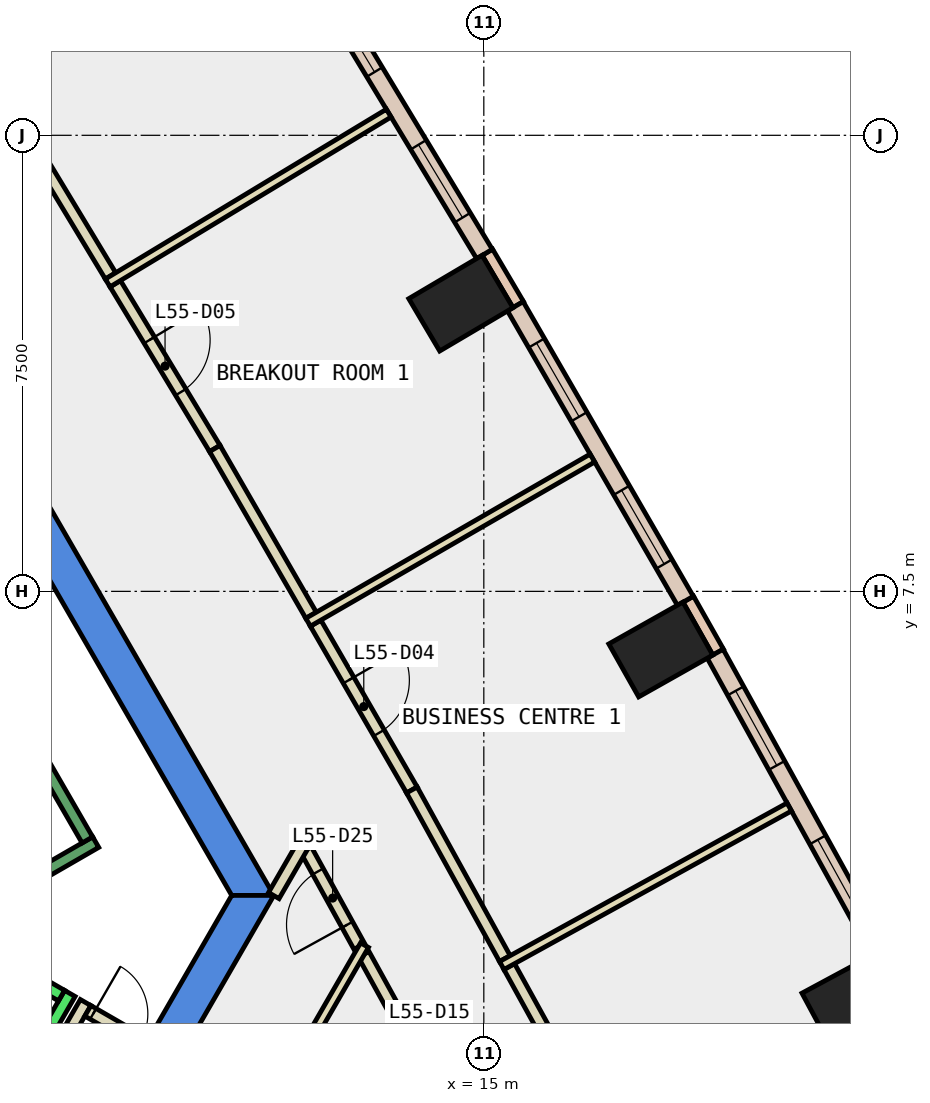
"""IFC4 building model, lengths in metres.
Left out: names, types, materials, properties, quantities, classifications, styles, units other than length and angle.
Written with IfcOpenShell. Run it as: python <this file> out.ifc"""

import sys

from ifc_helpers import new_model, si_unit, direction, frame, frame_2d, origin, origin_2d, place, context, subcontext, project, spatial, polyline, rectangle, outline, extrude, element, fill, save


model = new_model("IFC4")
c1 = context("Model", 3, precision=1e-05, world=origin(), true_north=direction((0.0, 1.0)))
c2 = subcontext(c1, "Body", "Model", "MODEL_VIEW")
j1 = project(units=[si_unit("LENGTHUNIT", "METRE"), si_unit("PLANEANGLEUNIT", "RADIAN")], contexts=[c1])
p1 = place(None, origin())
s1 = spatial("IfcSite", under=j1, at=p1, CompositionType="ELEMENT")
p2 = place(p1, origin())
s2 = spatial("IfcBuilding", under=s1, at=p2, CompositionType="ELEMENT")
p3 = place(p2, frame((0.0, 0.0, 245.0)))
s3 = spatial("IfcBuildingStorey", under=s2, at=p3, CompositionType="ELEMENT", Elevation=245.0)
for number, where, z_axis, x_axis in (
    (1, (21.086, 0.784, -0.34), (0.0, 0.0, 1.0), (-0.474, 0.881, 0.0)),
    (2, (17.911, 6.544, -0.34), (0.0, 0.0, 1.0), (-0.491, 0.871, 0.0)),
    (3, (14.623, 12.239, -0.34), (0.0, 0.0, 1.0), (-0.509, 0.861, 0.0)),
):
    element("IfcColumn", number, at=place(p3, frame(where, z_axis=z_axis, x_axis=x_axis)), inside=s3, PredefinedType="COLUMN", context=c2, shape_type="SweptSolid", body=[
        extrude(rectangle(XDim=1.0, YDim=1.4, at=origin_2d()), origin(), (0.0, 0.0, 1.0), 3.6),
    ])
p4 = place(p3, frame((0.0, 0.0, -0.34)))
e4 = element("IfcWall", 4, at=p4, inside=s3, PredefinedType="SHEAR", context=c2, shape_type="SweptSolid", body=[
    extrude(outline(polyline([(6.786, 10.747), (6.266, 10.447), (10.854, 2.5), (11.547, 2.5), (6.786, 10.747)])), origin(), (0.0, 0.0, 1.0), 3.6),
])
p5 = place(p3, frame((0.0, 0.0, -0.34)))
e5 = element("IfcWall", 5, at=p5, inside=s3, PredefinedType="SHEAR", context=c2, shape_type="SweptSolid", body=[
    extrude(outline(polyline([(5.774, -7.5), (11.547, 2.5), (10.854, 2.5), (5.427, -6.9), (5.774, -7.5)])), origin(), (0.0, 0.0, 1.0), 3.6),
])
p6 = place(p3, frame((18.854, 6.501, 0.0), z_axis=(0.0, 0.0, 1.0), x_axis=(-0.491743606947, 0.87074004446, 0.0)))
e6 = element("IfcWall", 6, at=p6, inside=s3, PredefinedType="STANDARD", context=c2, shape_type="SweptSolid", body=[
    extrude(rectangle(XDim=1.0, YDim=0.2, at=frame_2d((0.5, 0.0))), origin(), (0.0, 0.0, 1.0), 3.26),
])
p7 = place(p3, frame((15.566, 12.216, 0.0), z_axis=(0.0, 0.0, 1.0), x_axis=(-0.508087253435, 0.86130560366, 0.0)))
e7 = element("IfcWall", 7, at=p7, inside=s3, PredefinedType="STANDARD", context=c2, shape_type="SweptSolid", body=[
    extrude(rectangle(XDim=1.0, YDim=0.2, at=frame_2d((0.5, 0.0))), origin(), (0.0, 0.0, 1.0), 3.26),
])
p8 = place(p3, frame((21.505, 1.577, 0.0), z_axis=(0.0, 0.0, 1.0), x_axis=(-0.482734585173, 0.875766704253, 0.0)))
e8 = element("IfcWall", 8, at=p8, inside=s3, PredefinedType="STANDARD", context=c2, shape_type="SweptSolid", body=[
    extrude(rectangle(XDim=5.593, YDim=0.3, at=frame_2d((2.796, 0.0))), origin(), (0.0, 0.0, 1.0), 3.26),
])
p9 = place(p8, frame((0.698, 0.0, 0.9)))
e9 = element("IfcOpeningElement", 9, at=p9, cuts=e8, PredefinedType="OPENING", context=c2, shape_type="SweptSolid", body=[
    extrude(rectangle(XDim=1.4, YDim=2.0, at=frame_2d((0.7, 1.0))), frame((0.0, 0.16, 0.0), z_axis=(0.0, -1.0, 0.0), x_axis=(1.0, 0.0, 0.0)), (0.0, 0.0, 1.0), 0.32),
])
p10 = place(p8, frame((3.495, 0.0, 0.9)))
e10 = element("IfcOpeningElement", 10, at=p10, cuts=e8, PredefinedType="OPENING", context=c2, shape_type="SweptSolid", body=[
    extrude(rectangle(XDim=1.4, YDim=2.0, at=frame_2d((0.7, 1.0))), frame((0.0, 0.16, 0.0), z_axis=(0.0, -1.0, 0.0), x_axis=(1.0, 0.0, 0.0)), (0.0, 0.0, 1.0), 0.32),
])
p11 = place(p3, frame((18.315, 7.344, 0.0), z_axis=(0.0, 0.0, 1.0), x_axis=(-0.49995037644, 0.866054052065, 0.0)))
e11 = element("IfcWall", 11, at=p11, inside=s3, PredefinedType="STANDARD", context=c2, shape_type="SweptSolid", body=[
    extrude(rectangle(XDim=5.594, YDim=0.3, at=frame_2d((2.797, 0.0))), origin(), (0.0, 0.0, 1.0), 3.26),
])
p12 = place(p11, frame((0.699, 0.0, 0.9)))
e12 = element("IfcOpeningElement", 12, at=p12, cuts=e11, PredefinedType="OPENING", context=c2, shape_type="SweptSolid", body=[
    extrude(rectangle(XDim=1.4, YDim=2.0, at=frame_2d((0.7, 1.0))), frame((0.0, 0.16, 0.0), z_axis=(0.0, -1.0, 0.0), x_axis=(1.0, 0.0, 0.0)), (0.0, 0.0, 1.0), 0.32),
])
p13 = place(p11, frame((3.496, 0.0, 0.9)))
e13 = element("IfcOpeningElement", 13, at=p13, cuts=e11, PredefinedType="OPENING", context=c2, shape_type="SweptSolid", body=[
    extrude(rectangle(XDim=1.4, YDim=2.0, at=frame_2d((0.7, 1.0))), frame((0.0, 0.16, 0.0), z_axis=(0.0, -1.0, 0.0), x_axis=(1.0, 0.0, 0.0)), (0.0, 0.0, 1.0), 0.32),
])
p14 = place(p3, frame((15.011, 13.048, 0.0), z_axis=(0.0, 0.0, 1.0), x_axis=(-0.517169592475, 0.855882943293, 0.0)))
e14 = element("IfcWall", 14, at=p14, inside=s3, PredefinedType="STANDARD", context=c2, shape_type="SweptSolid", body=[
    extrude(rectangle(XDim=5.594, YDim=0.3, at=frame_2d((2.797, 0.0))), origin(), (0.0, 0.0, 1.0), 3.26),
])
p15 = place(p14, frame((0.699, 0.0, 0.9)))
e15 = element("IfcOpeningElement", 15, at=p15, cuts=e14, PredefinedType="OPENING", context=c2, shape_type="SweptSolid", body=[
    extrude(rectangle(XDim=1.4, YDim=2.0, at=frame_2d((0.7, 1.0))), frame((0.0, 0.16, 0.0), z_axis=(0.0, -1.0, 0.0), x_axis=(1.0, 0.0, 0.0)), (0.0, 0.0, 1.0), 0.32),
])
p16 = place(p14, frame((3.496, 0.0, 0.9)))
e16 = element("IfcOpeningElement", 16, at=p16, cuts=e14, PredefinedType="OPENING", context=c2, shape_type="SweptSolid", body=[
    extrude(rectangle(XDim=1.4, YDim=2.0, at=frame_2d((0.7, 1.0))), frame((0.0, 0.16, 0.0), z_axis=(0.0, -1.0, 0.0), x_axis=(1.0, 0.0, 0.0)), (0.0, 0.0, 1.0), 0.32),
])
p17 = place(p3, frame((12.952, 1.661, 0.0), z_axis=(0.0, 0.0, 1.0), x_axis=(-0.482707835392, 0.875781448566, 0.0)))
e17 = element("IfcWall", 17, at=p17, inside=s3, PredefinedType="PARTITIONING", context=c2, shape_type="SweptSolid", body=[
    extrude(rectangle(XDim=1.817, YDim=0.2, at=frame_2d((0.908, 0.0))), origin(), (0.0, 0.0, 1.0), 3.26),
])
p18 = place(p17, frame((0.408, 0.0, 0.0)))
e18 = element("IfcOpeningElement", 18, at=p18, cuts=e17, PredefinedType="OPENING", context=c2, shape_type="SweptSolid", body=[
    extrude(rectangle(XDim=1.0, YDim=2.1, at=frame_2d((0.5, 1.05))), frame((0.0, 0.11, 0.0), z_axis=(0.0, -1.0, 0.0), x_axis=(1.0, 0.0, 0.0)), (0.0, 0.0, 1.0), 0.22),
])
p19 = place(p3, frame((12.079, 3.419, 0.0), z_axis=(0.0, 0.0, 1.0), x_axis=(-0.500674759037, -0.865635480825, 0.0)))
e19 = element("IfcWall", 19, at=p19, inside=s3, PredefinedType="PARTITIONING", context=c2, shape_type="SweptSolid", body=[
    extrude(rectangle(XDim=1.065, YDim=0.2, at=frame_2d((0.532, 0.0))), origin(), (0.0, 0.0, 1.0), 3.26),
])
p20 = place(p3, frame((15.186, -2.391, 0.0), z_axis=(0.0, 0.0, 1.0), x_axis=(-0.482858240592, 0.875698532311, 0.0)))
e20 = element("IfcWall", 20, at=p20, inside=s3, PredefinedType="PARTITIONING", context=c2, shape_type="SweptSolid", body=[
    extrude(rectangle(XDim=4.478, YDim=0.2, at=frame_2d((2.239, 0.0))), origin(), (0.0, 0.0, 1.0), 3.26),
])
p21 = place(p20, frame((1.739, 0.0, 0.0)))
e21 = element("IfcOpeningElement", 21, at=p21, cuts=e20, PredefinedType="OPENING", context=c2, shape_type="SweptSolid", body=[
    extrude(rectangle(XDim=1.0, YDim=2.1, at=frame_2d((0.5, 1.05))), frame((0.0, 0.11, 0.0), z_axis=(0.0, -1.0, 0.0), x_axis=(1.0, 0.0, 0.0)), (0.0, 0.0, 1.0), 0.22),
])
p22 = place(p3, frame((15.418, 1.33, 0.0), z_axis=(0.0, 0.0, 1.0), x_axis=(0.482838875149, -0.875709210095, 0.0)))
e22 = element("IfcWall", 22, at=p22, inside=s3, PredefinedType="PARTITIONING", context=c2, shape_type="SweptSolid", body=[
    extrude(rectangle(XDim=3.167, YDim=0.2, at=frame_2d((1.583, 0.0))), origin(), (0.0, 0.0, 1.0), 3.26),
])
p23 = place(p3, frame((12.234, 6.977, 0.0), z_axis=(0.0, 0.0, 1.0), x_axis=(0.499820325382, -0.866129114125, 0.0)))
e23 = element("IfcWall", 23, at=p23, inside=s3, PredefinedType="PARTITIONING", context=c2, shape_type="SweptSolid", body=[
    extrude(rectangle(XDim=3.167, YDim=0.2, at=frame_2d((1.583, 0.0))), origin(), (0.0, 0.0, 1.0), 3.26),
])
p24 = place(p23, frame((1.084, 0.0, 0.0)))
e24 = element("IfcOpeningElement", 24, at=p24, cuts=e23, PredefinedType="OPENING", context=c2, shape_type="SweptSolid", body=[
    extrude(rectangle(XDim=1.0, YDim=2.1, at=frame_2d((0.5, 1.05))), frame((0.0, 0.11, 0.0), z_axis=(0.0, -1.0, 0.0), x_axis=(1.0, 0.0, 0.0)), (0.0, 0.0, 1.0), 0.22),
])
p25 = place(p3, frame((13.817, 4.234, 0.0), z_axis=(0.0, 0.0, 1.0), x_axis=(0.482871474341, -0.875691235121, 0.0)))
e25 = element("IfcWall", 25, at=p25, inside=s3, PredefinedType="PARTITIONING", context=c2, shape_type="SweptSolid", body=[
    extrude(rectangle(XDim=3.167, YDim=0.2, at=frame_2d((1.583, 0.0))), origin(), (0.0, 0.0, 1.0), 3.26),
])
p26 = place(p3, frame((8.939, 12.559, 0.0), z_axis=(0.0, 0.0, 1.0), x_axis=(0.517045022441, -0.855958202699, 0.0)))
e26 = element("IfcWall", 26, at=p26, inside=s3, PredefinedType="PARTITIONING", context=c2, shape_type="SweptSolid", body=[
    extrude(rectangle(XDim=3.166, YDim=0.2, at=frame_2d((1.583, 0.0))), origin(), (0.0, 0.0, 1.0), 3.26),
])
p27 = place(p26, frame((1.083, 0.0, 0.0)))
e27 = element("IfcOpeningElement", 27, at=p27, cuts=e26, PredefinedType="OPENING", context=c2, shape_type="SweptSolid", body=[
    extrude(rectangle(XDim=1.0, YDim=2.1, at=frame_2d((0.5, 1.05))), frame((0.0, 0.11, 0.0), z_axis=(0.0, -1.0, 0.0), x_axis=(1.0, 0.0, 0.0)), (0.0, 0.0, 1.0), 0.22),
])
p28 = place(p3, frame((10.576, 9.849, 0.0), z_axis=(0.0, 0.0, 1.0), x_axis=(0.499953838557, -0.866052053466, 0.0)))
e28 = element("IfcWall", 28, at=p28, inside=s3, PredefinedType="PARTITIONING", context=c2, shape_type="SweptSolid", body=[
    extrude(rectangle(XDim=3.166, YDim=0.2, at=frame_2d((1.583, 0.0))), origin(), (0.0, 0.0, 1.0), 3.26),
])
p29 = place(p3, frame((7.224, 15.399, 0.0), z_axis=(0.0, 0.0, 1.0), x_axis=(0.51690854001, -0.856040630615, 0.0)))
e29 = element("IfcWall", 29, at=p29, inside=s3, PredefinedType="PARTITIONING", context=c2, shape_type="SweptSolid", body=[
    extrude(rectangle(XDim=3.167, YDim=0.2, at=frame_2d((1.583, 0.0))), origin(), (0.0, 0.0, 1.0), 3.26),
])
p30 = place(p3, frame((5.751, -3.938, 0.0), z_axis=(0.0, 0.0, 1.0), x_axis=(0.500034260056, 0.866005622828, 0.0)))
e30 = element("IfcWall", 30, at=p30, inside=s3, PredefinedType="PARTITIONING", context=c2, shape_type="SweptSolid", body=[
    extrude(rectangle(XDim=5.399, YDim=0.2, at=frame_2d((2.7, 0.0))), origin(), (0.0, 0.0, 1.0), 3.26),
])
p31 = place(p3, frame((8.488, 0.602, 0.0), z_axis=(0.0, 0.0, 1.0), x_axis=(0.866063652425, -0.499933745558, 0.0)))
e31 = element("IfcWall", 31, at=p31, inside=s3, PredefinedType="PARTITIONING", context=c2, shape_type="SweptSolid", body=[
    extrude(rectangle(XDim=1.1, YDim=0.2, at=frame_2d((0.55, 0.0))), origin(), (0.0, 0.0, 1.0), 3.26),
])
p32 = place(p31, frame((0.1, 0.0, 0.0)))
e32 = element("IfcOpeningElement", 32, at=p32, cuts=e31, PredefinedType="OPENING", context=c2, shape_type="SweptSolid", body=[
    extrude(rectangle(XDim=0.9, YDim=2.1, at=frame_2d((0.45, 1.05))), frame((0.0, 0.11, 0.0), z_axis=(0.0, -1.0, 0.0), x_axis=(1.0, 0.0, 0.0)), (0.0, 0.0, 1.0), 0.22),
])
p33 = place(p3, frame((9.358, -4.692, 0.0), z_axis=(0.0, 0.0, 1.0), x_axis=(0.500027777314, 0.866009365951, 0.0)))
e33 = element("IfcWall", 33, at=p33, inside=s3, PredefinedType="PARTITIONING", context=c2, shape_type="SweptSolid", body=[
    extrude(rectangle(XDim=7.36, YDim=0.15, at=frame_2d((3.68, 0.0))), origin(), (0.0, 0.0, 1.0), 3.26),
])
p34 = place(p3, frame((15.295, 1.347, 0.0), z_axis=(0.0, 0.0, 1.0), x_axis=(0.875728645362, 0.482803624358, 0.0)))
e34 = element("IfcWall", 34, at=p34, inside=s3, PredefinedType="PARTITIONING", context=c2, shape_type="SweptSolid", body=[
    extrude(rectangle(XDim=5.4, YDim=0.15, at=frame_2d((2.7, 0.0))), origin(), (0.0, 0.0, 1.0), 3.26),
])
p35 = place(p3, frame((12.11, 6.992, 0.0), z_axis=(0.0, 0.0, 1.0), x_axis=(0.865994316829, 0.50005384032, 0.0)))
e35 = element("IfcWall", 35, at=p35, inside=s3, PredefinedType="PARTITIONING", context=c2, shape_type="SweptSolid", body=[
    extrude(rectangle(XDim=5.399, YDim=0.15, at=frame_2d((2.7, 0.0))), origin(), (0.0, 0.0, 1.0), 3.26),
])
p36 = place(p3, frame((8.814, 12.572, 0.0), z_axis=(0.0, 0.0, 1.0), x_axis=(0.855957229262, 0.517046633945, 0.0)))
e36 = element("IfcWall", 36, at=p36, inside=s3, PredefinedType="PARTITIONING", context=c2, shape_type="SweptSolid", body=[
    extrude(rectangle(XDim=5.4, YDim=0.15, at=frame_2d((2.7, 0.0))), origin(), (0.0, 0.0, 1.0), 3.26),
])
p37 = place(p3, frame((5.492, -3.788, 0.0), z_axis=(0.0, 0.0, 1.0), x_axis=(0.500034260056, 0.866005622828, 0.0)))
e37 = element("IfcWall", 37, at=p37, inside=s3, PredefinedType="STANDARD", context=c2, shape_type="SweptSolid", body=[
    extrude(rectangle(XDim=5.399, YDim=0.2, at=frame_2d((2.7, 0.0))), origin(), (0.0, 0.0, 1.0), 3.26),
])
p38 = place(p3, frame((5.977, 2.052, 0.0), z_axis=(0.0, 0.0, 1.0), x_axis=(0.865973769406, -0.500089422704, 0.0)))
e38 = element("IfcWall", 38, at=p38, inside=s3, PredefinedType="STANDARD", context=c2, shape_type="SweptSolid", body=[
    extrude(rectangle(XDim=2.399, YDim=0.2, at=frame_2d((1.2, 0.0))), origin(), (0.0, 0.0, 1.0), 3.26),
])
p39 = place(p3, frame((4.806, 1.176, 0.0), z_axis=(0.0, 0.0, 1.0), x_axis=(0.866059941101, 0.499940174841, 0.0)))
e39 = element("IfcWall", 39, at=p39, inside=s3, PredefinedType="STANDARD", context=c2, shape_type="SweptSolid", body=[
    extrude(rectangle(XDim=4.4, YDim=0.2, at=frame_2d((2.2, 0.0))), origin(), (0.0, 0.0, 1.0), 3.26),
])
p40 = place(p39, frame((2.4, 0.0, 0.0)))
e40 = element("IfcOpeningElement", 40, at=p40, cuts=e39, PredefinedType="OPENING", context=c2, shape_type="SweptSolid", body=[
    extrude(rectangle(XDim=1.1, YDim=2.2, at=frame_2d((0.55, 1.1))), frame((0.0, 0.11, 0.0), z_axis=(0.0, -1.0, 0.0), x_axis=(1.0, 0.0, 0.0)), (0.0, 0.0, 1.0), 0.22),
])
p41 = place(p3, frame((8.48, 3.412, 0.0), z_axis=(0.0, 0.0, 1.0), x_axis=(-0.499978703459, 0.866037698999, 0.0)))
e41 = element("IfcWall", 41, at=p41, inside=s3, PredefinedType="STANDARD", context=c2, shape_type="SweptSolid", body=[
    extrude(rectangle(XDim=6.9, YDim=0.2, at=frame_2d((3.45, 0.0))), origin(), (0.0, 0.0, 1.0), 3.26),
])
p42 = place(p9, origin())
e42 = element("IfcWindow", 42, at=p42, inside=s3, PartitioningType="SINGLE_PANEL", PredefinedType="WINDOW", context=c2, shape_type="SweptSolid", body=[
    extrude(rectangle(XDim=1.4, YDim=2.0, at=frame_2d((0.7, 1.0))), frame((0.0, 0.03, 0.0), z_axis=(0.0, -1.0, 0.0), x_axis=(1.0, 0.0, 0.0)), (0.0, 0.0, 1.0), 0.06),
])
fill(e9, e42)
p43 = place(p10, origin())
e43 = element("IfcWindow", 43, at=p43, inside=s3, PartitioningType="SINGLE_PANEL", PredefinedType="WINDOW", context=c2, shape_type="SweptSolid", body=[
    extrude(rectangle(XDim=1.4, YDim=2.0, at=frame_2d((0.7, 1.0))), frame((0.0, 0.03, 0.0), z_axis=(0.0, -1.0, 0.0), x_axis=(1.0, 0.0, 0.0)), (0.0, 0.0, 1.0), 0.06),
])
fill(e10, e43)
p44 = place(p12, origin())
e44 = element("IfcWindow", 44, at=p44, inside=s3, PartitioningType="SINGLE_PANEL", PredefinedType="WINDOW", context=c2, shape_type="SweptSolid", body=[
    extrude(rectangle(XDim=1.4, YDim=2.0, at=frame_2d((0.7, 1.0))), frame((0.0, 0.03, 0.0), z_axis=(0.0, -1.0, 0.0), x_axis=(1.0, 0.0, 0.0)), (0.0, 0.0, 1.0), 0.06),
])
fill(e12, e44)
p45 = place(p13, origin())
e45 = element("IfcWindow", 45, at=p45, inside=s3, PartitioningType="SINGLE_PANEL", PredefinedType="WINDOW", context=c2, shape_type="SweptSolid", body=[
    extrude(rectangle(XDim=1.4, YDim=2.0, at=frame_2d((0.7, 1.0))), frame((0.0, 0.03, 0.0), z_axis=(0.0, -1.0, 0.0), x_axis=(1.0, 0.0, 0.0)), (0.0, 0.0, 1.0), 0.06),
])
fill(e13, e45)
p46 = place(p15, origin())
e46 = element("IfcWindow", 46, at=p46, inside=s3, PartitioningType="SINGLE_PANEL", PredefinedType="WINDOW", context=c2, shape_type="SweptSolid", body=[
    extrude(rectangle(XDim=1.4, YDim=2.0, at=frame_2d((0.7, 1.0))), frame((0.0, 0.03, 0.0), z_axis=(0.0, -1.0, 0.0), x_axis=(1.0, 0.0, 0.0)), (0.0, 0.0, 1.0), 0.06),
])
fill(e15, e46)
p47 = place(p16, origin())
e47 = element("IfcWindow", 47, at=p47, inside=s3, PartitioningType="SINGLE_PANEL", PredefinedType="WINDOW", context=c2, shape_type="SweptSolid", body=[
    extrude(rectangle(XDim=1.4, YDim=2.0, at=frame_2d((0.7, 1.0))), frame((0.0, 0.03, 0.0), z_axis=(0.0, -1.0, 0.0), x_axis=(1.0, 0.0, 0.0)), (0.0, 0.0, 1.0), 0.06),
])
fill(e16, e47)
p48 = place(p24, origin())
e48 = element("IfcDoor", 48, at=p48, inside=s3, OperationType="SINGLE_SWING_LEFT", PredefinedType="DOOR", context=c2, shape_type="SweptSolid", body=[
    extrude(rectangle(XDim=1.0, YDim=2.1, at=frame_2d((0.5, 1.05))), frame((0.0, 0.025, 0.0), z_axis=(0.0, -1.0, 0.0), x_axis=(1.0, 0.0, 0.0)), (0.0, 0.0, 1.0), 0.05),
])
fill(e24, e48)
p49 = place(p27, origin())
e49 = element("IfcDoor", 49, at=p49, inside=s3, OperationType="SINGLE_SWING_LEFT", PredefinedType="DOOR", context=c2, shape_type="SweptSolid", body=[
    extrude(rectangle(XDim=1.0, YDim=2.1, at=frame_2d((0.5, 1.05))), frame((0.0, 0.025, 0.0), z_axis=(0.0, -1.0, 0.0), x_axis=(1.0, 0.0, 0.0)), (0.0, 0.0, 1.0), 0.05),
])
fill(e27, e49)
p50 = place(p18, origin())
e50 = element("IfcDoor", 50, at=p50, inside=s3, OperationType="SINGLE_SWING_RIGHT", PredefinedType="DOOR", context=c2, shape_type="SweptSolid", body=[
    extrude(rectangle(XDim=1.0, YDim=2.1, at=frame_2d((0.5, 1.05))), frame((0.0, 0.025, 0.0), z_axis=(0.0, -1.0, 0.0), x_axis=(1.0, 0.0, 0.0)), (0.0, 0.0, 1.0), 0.05),
])
fill(e18, e50)
p51 = place(p32, origin())
e51 = element("IfcDoor", 51, at=p51, inside=s3, OperationType="SINGLE_SWING_RIGHT", PredefinedType="DOOR", context=c2, shape_type="SweptSolid", body=[
    extrude(rectangle(XDim=0.9, YDim=2.1, at=frame_2d((0.45, 1.05))), frame((0.0, 0.025, 0.0), z_axis=(0.0, -1.0, 0.0), x_axis=(1.0, 0.0, 0.0)), (0.0, 0.0, 1.0), 0.05),
])
fill(e32, e51)
save(model, sys.argv[1])
